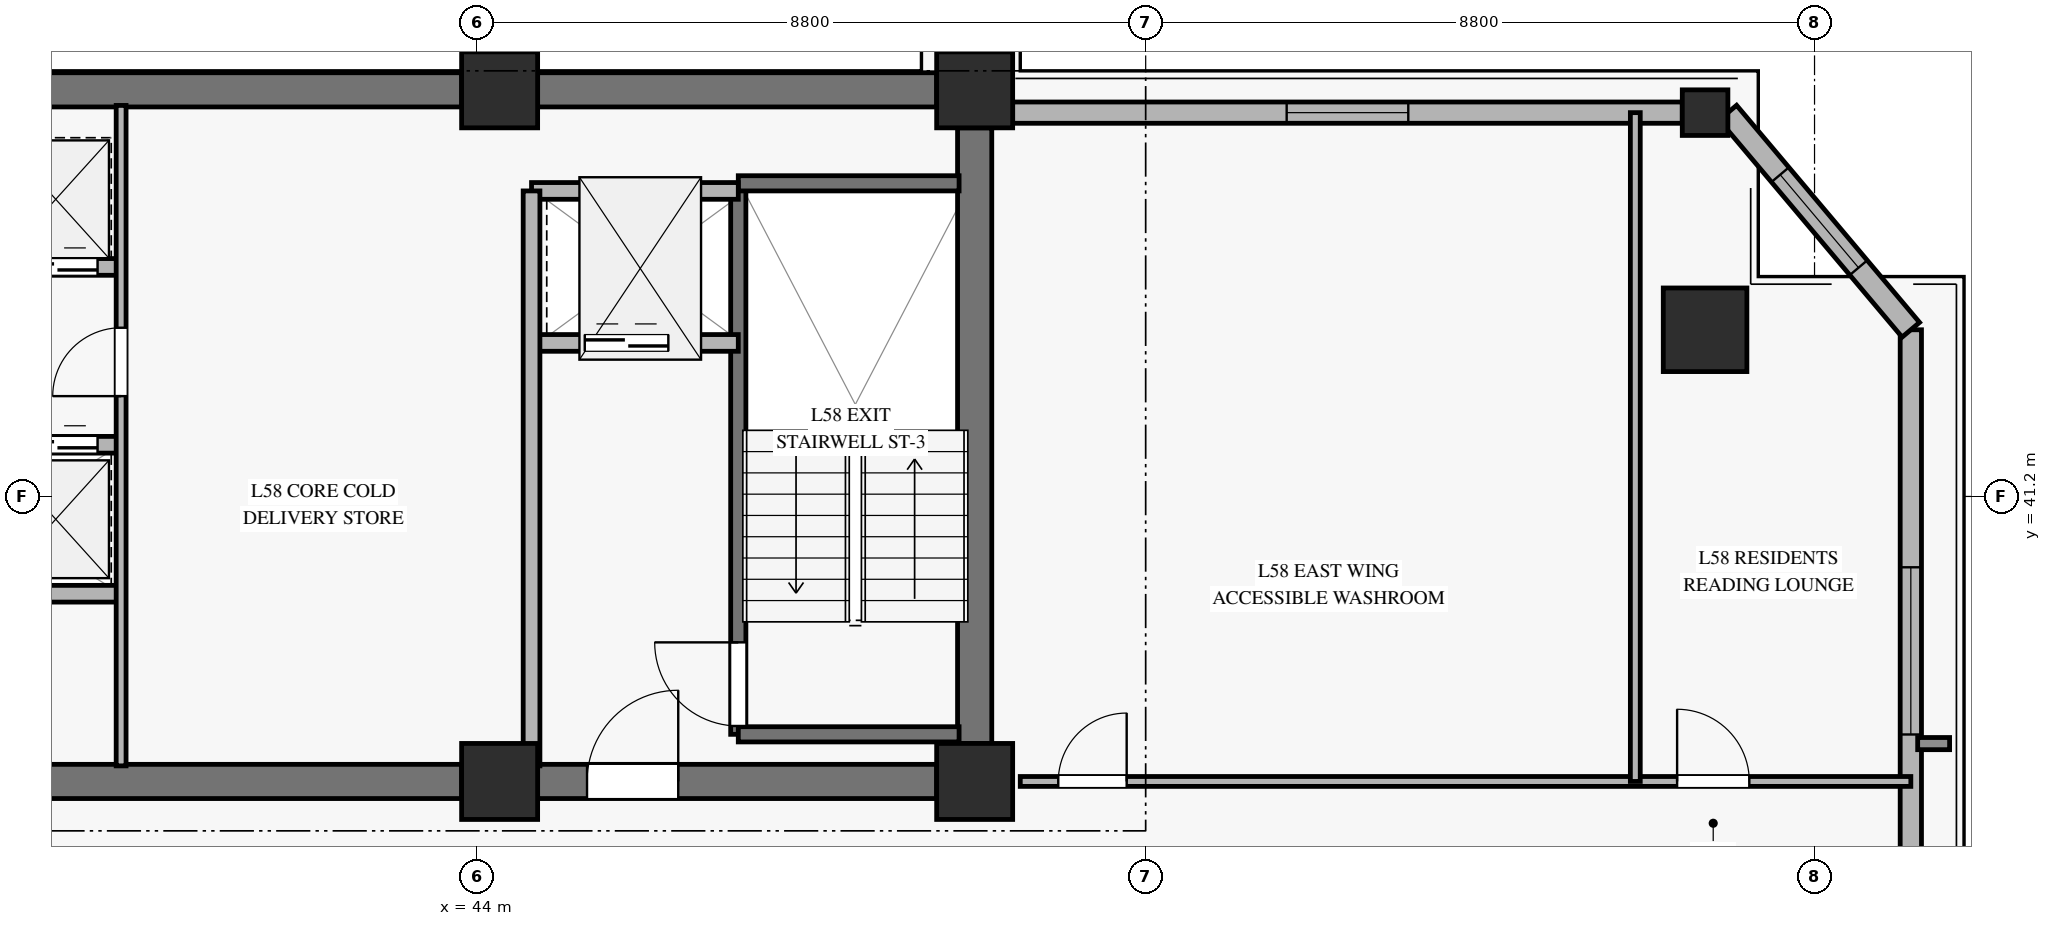
"""IFC4 building model, lengths in metres.
Left out: names, types, materials, properties, quantities, classifications, styles, units other than length and angle.
Written with IfcOpenShell. Run it as: python <this file> out.ifc"""

import sys

from ifc_helpers import new_model, si_unit, direction, frame, frame_2d, origin, origin_2d, place, context, subcontext, project, spatial, rectangle, hollow_rectangle, extrude, source, transform, mapped, element, fill, save


model = new_model("IFC4")
c1 = context("Model", 3, precision=1e-05, world=origin(), true_north=direction((0.0, 1.0)))
c2 = subcontext(c1, "Body", "Model", "MODEL_VIEW")
j1 = project(units=[si_unit("LENGTHUNIT", "METRE"), si_unit("PLANEANGLEUNIT", "RADIAN")], contexts=[c1])
p1 = place(None, origin())
s1 = spatial("IfcSite", under=j1, at=p1, CompositionType="ELEMENT")
p2 = place(p1, origin())
s2 = spatial("IfcBuilding", under=s1, at=p2, CompositionType="ELEMENT")
p3 = place(p2, frame((0.0, 0.0, 230.4)))
s3 = spatial("IfcBuildingStorey", under=s2, at=p3, CompositionType="ELEMENT", Elevation=230.4)
m1 = source(origin(), c2, "Body", "SweptSolid", [
    extrude(rectangle(XDim=1.0, YDim=1.0, at=origin_2d()), origin(), (0.0, 0.0, 1.0), 3.185),
])
for number, where, z_axis, x_axis in (
    (1, (44.3, 37.45, 0.0), (0.0, 0.0, 1.0), (1.0, 0.0, 0.0)),
    (2, (44.3, 46.55, 0.0), (0.0, 0.0, 1.0), (1.0, 0.0, 0.0)),
    (3, (50.55, 37.45, 0.0), (0.0, 0.0, 1.0), (1.0, 0.0, 0.0)),
    (4, (50.55, 46.55, 0.0), (0.0, 0.0, 1.0), (1.0, 0.0, 0.0)),
):
    element("IfcColumn", number, at=place(p3, frame(where, z_axis=z_axis, x_axis=x_axis)), inside=s3, PredefinedType="PILASTER", context=c2, shape_type="MappedRepresentation", body=[
        mapped(m1, transform((0.0, 0.0, 0.0), x_axis=(1.0, 0.0, 0.0), y_axis=(0.0, 1.0, 0.0), z_axis=(0.0, 0.0, 1.0), scale=1.0)),
    ])
p4 = place(p3, frame((36.1, 46.55, 0.0), z_axis=(0.0, 0.0, 1.0), x_axis=(1.0, 0.0, 0.0)))
e5 = element("IfcWall", 5, at=p4, inside=s3, PredefinedType="SHEAR", context=c2, shape_type="SweptSolid", body=[
    extrude(rectangle(XDim=7.7, YDim=0.45, at=frame_2d((3.85, 0.0))), origin(), (0.0, 0.0, 1.0), 3.185),
])
p5 = place(p3, frame((44.8, 46.55, 0.0), z_axis=(0.0, 0.0, 1.0), x_axis=(1.0, 0.0, 0.0)))
e6 = element("IfcWall", 6, at=p5, inside=s3, PredefinedType="SHEAR", context=c2, shape_type="SweptSolid", body=[
    extrude(rectangle(XDim=5.25, YDim=0.45, at=frame_2d((2.625, 0.0))), origin(), (0.0, 0.0, 1.0), 3.185),
])
p6 = place(p3, frame((36.1, 37.45, 0.0), z_axis=(0.0, 0.0, 1.0), x_axis=(1.0, 0.0, 0.0)))
e7 = element("IfcWall", 7, at=p6, inside=s3, PredefinedType="SHEAR", context=c2, shape_type="SweptSolid", body=[
    extrude(rectangle(XDim=7.7, YDim=0.45, at=frame_2d((3.85, 0.0))), origin(), (0.0, 0.0, 1.0), 3.185),
])
p7 = place(p3, frame((44.8, 37.45, 0.0), z_axis=(0.0, 0.0, 1.0), x_axis=(1.0, 0.0, 0.0)))
e8 = element("IfcWall", 8, at=p7, inside=s3, PredefinedType="SHEAR", context=c2, shape_type="SweptSolid", body=[
    extrude(rectangle(XDim=5.25, YDim=0.45, at=frame_2d((2.625, 0.0))), origin(), (0.0, 0.0, 1.0), 3.185),
])
p8 = place(p7, frame((0.65, 0.0, 0.0)))
e9 = element("IfcOpeningElement", 9, at=p8, cuts=e8, PredefinedType="OPENING", context=c2, shape_type="SweptSolid", body=[
    extrude(rectangle(XDim=1.2, YDim=2.15, at=frame_2d((0.6, 1.075))), frame((0.0, 0.235, 0.0), z_axis=(0.0, -1.0, 0.0), x_axis=(1.0, 0.0, 0.0)), (0.0, 0.0, 1.0), 0.47),
])
p9 = place(p3, frame((50.55, 37.95, 0.0), z_axis=(0.0, 0.0, 1.0), x_axis=(0.0, 1.0, 0.0)))
e10 = element("IfcWall", 10, at=p9, inside=s3, PredefinedType="SHEAR", context=c2, shape_type="SweptSolid", body=[
    extrude(rectangle(XDim=8.1, YDim=0.45, at=frame_2d((4.05, 0.0))), origin(), (0.0, 0.0, 1.0), 3.185),
])
m2 = source(origin(), c2, "Body", "SweptSolid", [
    extrude(hollow_rectangle(XDim=1.1, YDim=1.1, WallThickness=0.05, at=origin_2d()), origin(), (0.0, 0.0, 1.0), 3.185),
])
p10 = place(p3, frame((60.16, 43.393, 0.0), z_axis=(0.0, 0.0, 1.0), x_axis=(1.0, 0.0, 0.0)))
e11 = element("IfcColumn", 11, at=p10, inside=s3, PredefinedType="COLUMN", context=c2, shape_type="MappedRepresentation", body=[
    mapped(m2, transform((0.0, 0.0, 0.0), x_axis=(1.0, 0.0, 0.0), y_axis=(0.0, 1.0, 0.0), z_axis=(0.0, 0.0, 1.0), scale=1.0)),
])
m3 = source(origin(), c2, "Body", "SweptSolid", [
    extrude(hollow_rectangle(XDim=0.6, YDim=0.6, WallThickness=0.028, at=origin_2d()), origin(), (0.0, 0.0, 1.0), 3.185),
])
p11 = place(p3, frame((60.16, 46.25, 0.0), z_axis=(0.0, 0.0, 1.0), x_axis=(1.0, 0.0, 0.0)))
e12 = element("IfcColumn", 12, at=p11, inside=s3, PredefinedType="COLUMN", context=c2, shape_type="MappedRepresentation", body=[
    mapped(m3, transform((0.0, 0.0, 0.0), x_axis=(1.0, 0.0, 0.0), y_axis=(0.0, 1.0, 0.0), z_axis=(0.0, 0.0, 1.0), scale=1.0)),
])
p12 = place(p3, frame((62.867, 29.975, 0.0), z_axis=(0.0, 0.0, 1.0), x_axis=(0.0, 1.0, 0.0)))
e13 = element("IfcWall", 13, at=p12, inside=s3, PredefinedType="SOLIDWALL", context=c2, shape_type="SweptSolid", body=[
    extrude(rectangle(XDim=13.418, YDim=0.28, at=frame_2d((6.709, 0.0))), origin(), (0.0, 0.0, 1.0), 2.815),
])
p13 = place(p12, frame((8.093, 0.0, 0.45)))
e14 = element("IfcOpeningElement", 14, at=p13, cuts=e13, PredefinedType="OPENING", context=c2, shape_type="SweptSolid", body=[
    extrude(rectangle(XDim=2.2, YDim=2.1, at=frame_2d((1.1, 1.05))), frame((0.0, 0.15, 0.0), z_axis=(0.0, -1.0, 0.0), x_axis=(1.0, 0.0, 0.0)), (0.0, 0.0, 1.0), 0.3),
])
p14 = place(p3, frame((51.05, 46.25, 0.0), z_axis=(0.0, 0.0, 1.0), x_axis=(1.0, 0.0, 0.0)))
e15 = element("IfcWall", 15, at=p14, inside=s3, PredefinedType="SOLIDWALL", context=c2, shape_type="SweptSolid", body=[
    extrude(rectangle(XDim=8.81, YDim=0.28, at=frame_2d((4.405, 0.0))), origin(), (0.0, 0.0, 1.0), 2.815),
])
p15 = place(p14, frame((3.605, 0.0, 0.45)))
e16 = element("IfcOpeningElement", 16, at=p15, cuts=e15, PredefinedType="OPENING", context=c2, shape_type="SweptSolid", body=[
    extrude(rectangle(XDim=1.6, YDim=2.0, at=frame_2d((0.8, 1.0))), frame((0.0, 0.15, 0.0), z_axis=(0.0, -1.0, 0.0), x_axis=(1.0, 0.0, 0.0)), (0.0, 0.0, 1.0), 0.3),
])
p16 = place(p3, frame((62.867, 43.393, 0.0), z_axis=(0.0, 0.0, 1.0), x_axis=(-0.644314839722, 0.764760346326, 0.0)))
e17 = element("IfcWall", 17, at=p16, inside=s3, PredefinedType="SOLIDWALL", context=c2, shape_type="SweptSolid", body=[
    extrude(rectangle(XDim=3.736, YDim=0.3, at=frame_2d((1.868, 0.0))), origin(), (0.0, 0.0, 1.0), 2.815),
])
p17 = place(p16, frame((1.068, 0.0, 0.45)))
e18 = element("IfcOpeningElement", 18, at=p17, cuts=e17, PredefinedType="OPENING", context=c2, shape_type="SweptSolid", body=[
    extrude(rectangle(XDim=1.6, YDim=2.0, at=frame_2d((0.8, 1.0))), frame((0.0, 0.16, 0.0), z_axis=(0.0, -1.0, 0.0), x_axis=(1.0, 0.0, 0.0)), (0.0, 0.0, 1.0), 0.32),
])
p18 = place(p3, frame((47.44, 38.07, 0.0), z_axis=(0.0, 0.0, 1.0), x_axis=(0.0, 1.0, 0.0)))
e19 = element("IfcWall", 19, at=p18, inside=s3, PredefinedType="SOLIDWALL", context=c2, shape_type="SweptSolid", body=[
    extrude(rectangle(XDim=7.25, YDim=0.2, at=frame_2d((3.625, 0.0))), origin(), (0.0, 0.0, 1.0), 3.4),
])
p19 = place(p18, frame((0.11, 0.0, 0.0)))
e20 = element("IfcOpeningElement", 20, at=p19, cuts=e19, PredefinedType="OPENING", context=c2, shape_type="SweptSolid", body=[
    extrude(rectangle(XDim=1.1, YDim=2.15, at=frame_2d((0.55, 1.075))), frame((0.0, 0.11, 0.0), z_axis=(0.0, -1.0, 0.0), x_axis=(1.0, 0.0, 0.0)), (0.0, 0.0, 1.0), 0.22),
])
for number, where, z_axis, x_axis in (
    (21, (47.44, 45.32, 0.0), (0.0, 0.0, 1.0), (1.0, 0.0, 0.0)),
    (22, (47.44, 38.07, 0.0), (0.0, 0.0, 1.0), (1.0, 0.0, 0.0)),
):
    element("IfcWall", number, at=place(p3, frame(where, z_axis=z_axis, x_axis=x_axis)), inside=s3, PredefinedType="SOLIDWALL", context=c2, shape_type="SweptSolid", body=[
        extrude(rectangle(XDim=2.905, YDim=0.2, at=frame_2d((1.453, 0.0))), origin(), (0.0, 0.0, 1.0), 3.4),
    ])
p20 = place(p3, frame((44.72, 43.22, 0.0), z_axis=(0.0, 0.0, 1.0), x_axis=(1.0, 0.0, 0.0)))
e23 = element("IfcWall", 23, at=p20, inside=s3, PredefinedType="SOLIDWALL", context=c2, shape_type="SweptSolid", body=[
    extrude(rectangle(XDim=2.72, YDim=0.22, at=frame_2d((1.36, 0.0))), origin(), (0.0, 0.0, 1.0), 3.185),
])
p21 = place(p20, frame((0.7, 0.0, 0.0)))
e24 = element("IfcOpeningElement", 24, at=p21, cuts=e23, PredefinedType="OPENING", context=c2, shape_type="SweptSolid", body=[
    extrude(rectangle(XDim=1.1, YDim=2.2, at=frame_2d((0.55, 1.1))), frame((0.0, 0.12, 0.0), z_axis=(0.0, -1.0, 0.0), x_axis=(1.0, 0.0, 0.0)), (0.0, 0.0, 1.0), 0.24),
])
p22 = place(p3, frame((44.72, 45.22, 0.0), z_axis=(0.0, 0.0, 1.0), x_axis=(1.0, 0.0, 0.0)))
e25 = element("IfcWall", 25, at=p22, inside=s3, PredefinedType="SOLIDWALL", context=c2, shape_type="SweptSolid", body=[
    extrude(rectangle(XDim=2.72, YDim=0.22, at=frame_2d((1.36, 0.0))), origin(), (0.0, 0.0, 1.0), 3.185),
])
p23 = place(p3, frame((44.72, 37.655, 0.0), z_axis=(0.0, 0.0, 1.0), x_axis=(0.0, 1.0, 0.0)))
e26 = element("IfcWall", 26, at=p23, inside=s3, PredefinedType="SOLIDWALL", context=c2, shape_type="SweptSolid", body=[
    extrude(rectangle(XDim=7.565, YDim=0.22, at=frame_2d((3.782, 0.0))), origin(), (0.0, 0.0, 1.0), 3.185),
])
p24 = place(p3, frame((36.12, 44.22, 0.0), z_axis=(0.0, 0.0, 1.0), x_axis=(1.0, 0.0, 0.0)))
e27 = element("IfcWall", 27, at=p24, inside=s3, PredefinedType="SOLIDWALL", context=c2, shape_type="SweptSolid", body=[
    extrude(rectangle(XDim=3.2, YDim=0.22, at=frame_2d((1.6, 0.0))), origin(), (0.0, 0.0, 1.0), 3.185),
])
p25 = place(p24, frame((0.3, 0.0, 0.0)))
e28 = element("IfcOpeningElement", 28, at=p25, cuts=e27, PredefinedType="OPENING", context=c2, shape_type="SweptSolid", body=[
    extrude(rectangle(XDim=1.1, YDim=2.2, at=frame_2d((0.55, 1.1))), frame((0.0, 0.12, 0.0), z_axis=(0.0, -1.0, 0.0), x_axis=(1.0, 0.0, 0.0)), (0.0, 0.0, 1.0), 0.24),
])
p26 = place(p24, frame((1.79, 0.0, 0.0)))
e29 = element("IfcOpeningElement", 29, at=p26, cuts=e27, PredefinedType="OPENING", context=c2, shape_type="SweptSolid", body=[
    extrude(rectangle(XDim=1.1, YDim=2.2, at=frame_2d((0.55, 1.1))), frame((0.0, 0.12, 0.0), z_axis=(0.0, -1.0, 0.0), x_axis=(1.0, 0.0, 0.0)), (0.0, 0.0, 1.0), 0.24),
])
p27 = place(p3, frame((36.12, 41.88, 0.0), z_axis=(0.0, 0.0, 1.0), x_axis=(1.0, 0.0, 0.0)))
e30 = element("IfcWall", 30, at=p27, inside=s3, PredefinedType="SOLIDWALL", context=c2, shape_type="SweptSolid", body=[
    extrude(rectangle(XDim=3.2, YDim=0.22, at=frame_2d((1.6, 0.0))), origin(), (0.0, 0.0, 1.0), 3.185),
])
p28 = place(p27, frame((0.3, 0.0, 0.0)))
e31 = element("IfcOpeningElement", 31, at=p28, cuts=e30, PredefinedType="OPENING", context=c2, shape_type="SweptSolid", body=[
    extrude(rectangle(XDim=1.1, YDim=2.2, at=frame_2d((0.55, 1.1))), frame((0.0, 0.12, 0.0), z_axis=(0.0, -1.0, 0.0), x_axis=(1.0, 0.0, 0.0)), (0.0, 0.0, 1.0), 0.24),
])
p29 = place(p27, frame((1.79, 0.0, 0.0)))
e32 = element("IfcOpeningElement", 32, at=p29, cuts=e30, PredefinedType="OPENING", context=c2, shape_type="SweptSolid", body=[
    extrude(rectangle(XDim=1.1, YDim=2.2, at=frame_2d((0.55, 1.1))), frame((0.0, 0.12, 0.0), z_axis=(0.0, -1.0, 0.0), x_axis=(1.0, 0.0, 0.0)), (0.0, 0.0, 1.0), 0.24),
])
p30 = place(p3, frame((36.12, 39.92, 0.0), z_axis=(0.0, 0.0, 1.0), x_axis=(1.0, 0.0, 0.0)))
e33 = element("IfcWall", 33, at=p30, inside=s3, PredefinedType="SOLIDWALL", context=c2, shape_type="SweptSolid", body=[
    extrude(rectangle(XDim=3.2, YDim=0.22, at=frame_2d((1.6, 0.0))), origin(), (0.0, 0.0, 1.0), 3.185),
])
p31 = place(p3, frame((39.32, 37.655, 0.0), z_axis=(0.0, 0.0, 1.0), x_axis=(0.0, 1.0, 0.0)))
e34 = element("IfcWall", 34, at=p31, inside=s3, PredefinedType="PARTITIONING", context=c2, shape_type="SweptSolid", body=[
    extrude(rectangle(XDim=8.69, YDim=0.13, at=frame_2d((4.345, 0.0))), origin(), (0.0, 0.0, 1.0), 3.185),
])
p32 = place(p31, frame((4.865, 0.0, 0.0)))
e35 = element("IfcOpeningElement", 35, at=p32, cuts=e34, PredefinedType="OPENING", context=c2, shape_type="SweptSolid", body=[
    extrude(rectangle(XDim=0.9, YDim=2.1, at=frame_2d((0.45, 1.05))), frame((0.0, 0.075, 0.0), z_axis=(0.0, -1.0, 0.0), x_axis=(1.0, 0.0, 0.0)), (0.0, 0.0, 1.0), 0.15),
])
p33 = place(p3, frame((51.15, 37.45, 0.0), z_axis=(0.0, 0.0, 1.0), x_axis=(1.0, 0.0, 0.0)))
e36 = element("IfcWall", 36, at=p33, inside=s3, PredefinedType="PARTITIONING", context=c2, shape_type="SweptSolid", body=[
    extrude(rectangle(XDim=11.717, YDim=0.13, at=frame_2d((5.858, 0.0))), origin(), (0.0, 0.0, 1.0), 2.82),
])
p34 = place(p33, frame((0.5, 0.0, 0.0)))
e37 = element("IfcOpeningElement", 37, at=p34, cuts=e36, PredefinedType="OPENING", context=c2, shape_type="SweptSolid", body=[
    extrude(rectangle(XDim=0.9, YDim=2.1, at=frame_2d((0.45, 1.05))), frame((0.0, 0.075, 0.0), z_axis=(0.0, -1.0, 0.0), x_axis=(1.0, 0.0, 0.0)), (0.0, 0.0, 1.0), 0.15),
])
p35 = place(p33, frame((8.642, 0.0, 0.0)))
e38 = element("IfcOpeningElement", 38, at=p35, cuts=e36, PredefinedType="OPENING", context=c2, shape_type="SweptSolid", body=[
    extrude(rectangle(XDim=0.95, YDim=2.1, at=frame_2d((0.475, 1.05))), frame((0.0, 0.075, 0.0), z_axis=(0.0, -1.0, 0.0), x_axis=(1.0, 0.0, 0.0)), (0.0, 0.0, 1.0), 0.15),
])
p36 = place(p3, frame((59.242, 37.45, 0.0), z_axis=(0.0, 0.0, 1.0), x_axis=(0.0, 1.0, 0.0)))
e39 = element("IfcWall", 39, at=p36, inside=s3, PredefinedType="PARTITIONING", context=c2, shape_type="SweptSolid", body=[
    extrude(rectangle(XDim=8.8, YDim=0.13, at=frame_2d((4.4, 0.0))), origin(), (0.0, 0.0, 1.0), 3.185),
])
m4 = source(origin(), c2, "Body", "SweptSolid", [
    extrude(rectangle(XDim=2.2, YDim=2.1, at=frame_2d((1.1, 1.05))), frame((0.0, 0.03, 0.0), z_axis=(0.0, -1.0, 0.0), x_axis=(1.0, 0.0, 0.0)), (0.0, 0.0, 1.0), 0.06),
])
p37 = place(p13, origin())
e40 = element("IfcWindow", 40, at=p37, inside=s3, PartitioningType="SINGLE_PANEL", PredefinedType="WINDOW", context=c2, shape_type="MappedRepresentation", body=[
    mapped(m4, transform((0.0, 0.0, 0.0), x_axis=(1.0, 0.0, 0.0), y_axis=(0.0, 1.0, 0.0), z_axis=(0.0, 0.0, 1.0), scale=1.0)),
])
fill(e14, e40)
m5 = source(origin(), c2, "Body", "SweptSolid", [
    extrude(rectangle(XDim=1.6, YDim=2.0, at=frame_2d((0.8, 1.0))), frame((0.0, 0.03, 0.0), z_axis=(0.0, -1.0, 0.0), x_axis=(1.0, 0.0, 0.0)), (0.0, 0.0, 1.0), 0.06),
])
p38 = place(p15, origin())
e41 = element("IfcWindow", 41, at=p38, inside=s3, PartitioningType="SINGLE_PANEL", PredefinedType="WINDOW", context=c2, shape_type="MappedRepresentation", body=[
    mapped(m5, transform((0.0, 0.0, 0.0), x_axis=(1.0, 0.0, 0.0), y_axis=(0.0, 1.0, 0.0), z_axis=(0.0, 0.0, 1.0), scale=1.0)),
])
fill(e16, e41)
p39 = place(p17, origin())
e42 = element("IfcWindow", 42, at=p39, inside=s3, PartitioningType="SINGLE_PANEL", PredefinedType="WINDOW", context=c2, shape_type="MappedRepresentation", body=[
    mapped(m5, transform((0.0, 0.0, 0.0), x_axis=(1.0, 0.0, 0.0), y_axis=(0.0, 1.0, 0.0), z_axis=(0.0, 0.0, 1.0), scale=1.0)),
])
fill(e18, e42)
m6 = source(origin(), c2, "Body", "SweptSolid", [
    extrude(rectangle(XDim=1.1, YDim=2.15, at=frame_2d((0.55, 1.075))), frame((0.0, 0.025, 0.0), z_axis=(0.0, -1.0, 0.0), x_axis=(1.0, 0.0, 0.0)), (0.0, 0.0, 1.0), 0.05),
])
p40 = place(p19, origin())
e43 = element("IfcDoor", 43, at=p40, inside=s3, OperationType="SINGLE_SWING_RIGHT", PredefinedType="DOOR", context=c2, shape_type="MappedRepresentation", body=[
    mapped(m6, transform((0.0, 0.0, 0.0), x_axis=(1.0, 0.0, 0.0), y_axis=(0.0, 1.0, 0.0), z_axis=(0.0, 0.0, 1.0), scale=1.0)),
])
fill(e20, e43)
m7 = source(origin(), c2, "Body", "SweptSolid", [
    extrude(rectangle(XDim=1.1, YDim=2.2, at=frame_2d((0.55, 1.1))), frame((0.0, 0.025, 0.0), z_axis=(0.0, -1.0, 0.0), x_axis=(1.0, 0.0, 0.0)), (0.0, 0.0, 1.0), 0.05),
])
p41 = place(p21, origin())
e44 = element("IfcDoor", 44, at=p41, inside=s3, OperationType="SLIDING_TO_LEFT", PredefinedType="DOOR", context=c2, shape_type="MappedRepresentation", body=[
    mapped(m7, transform((0.0, 0.0, 0.0), x_axis=(1.0, 0.0, 0.0), y_axis=(0.0, 1.0, 0.0), z_axis=(0.0, 0.0, 1.0), scale=1.0)),
])
fill(e24, e44)
m8 = source(origin(), c2, "Body", "SweptSolid", [
    extrude(rectangle(XDim=1.2, YDim=2.15, at=frame_2d((0.6, 1.075))), frame((0.0, 0.025, 0.0), z_axis=(0.0, -1.0, 0.0), x_axis=(1.0, 0.0, 0.0)), (0.0, 0.0, 1.0), 0.05),
])
p42 = place(p8, origin())
e45 = element("IfcDoor", 45, at=p42, inside=s3, OperationType="SINGLE_SWING_RIGHT", PredefinedType="DOOR", context=c2, shape_type="MappedRepresentation", body=[
    mapped(m8, transform((0.0, 0.0, 0.0), x_axis=(1.0, 0.0, 0.0), y_axis=(0.0, 1.0, 0.0), z_axis=(0.0, 0.0, 1.0), scale=1.0)),
])
fill(e9, e45)
p43 = place(p26, origin())
e46 = element("IfcDoor", 46, at=p43, inside=s3, OperationType="SLIDING_TO_LEFT", PredefinedType="DOOR", context=c2, shape_type="MappedRepresentation", body=[
    mapped(m7, transform((0.0, 0.0, 0.0), x_axis=(1.0, 0.0, 0.0), y_axis=(0.0, 1.0, 0.0), z_axis=(0.0, 0.0, 1.0), scale=1.0)),
])
fill(e29, e46)
p44 = place(p29, origin())
e47 = element("IfcDoor", 47, at=p44, inside=s3, OperationType="SLIDING_TO_LEFT", PredefinedType="DOOR", context=c2, shape_type="MappedRepresentation", body=[
    mapped(m7, transform((0.0, 0.0, 0.0), x_axis=(1.0, 0.0, 0.0), y_axis=(0.0, 1.0, 0.0), z_axis=(0.0, 0.0, 1.0), scale=1.0)),
])
fill(e32, e47)
m9 = source(origin(), c2, "Body", "SweptSolid", [
    extrude(rectangle(XDim=0.9, YDim=2.1, at=frame_2d((0.45, 1.05))), frame((0.0, 0.025, 0.0), z_axis=(0.0, -1.0, 0.0), x_axis=(1.0, 0.0, 0.0)), (0.0, 0.0, 1.0), 0.05),
])
p45 = place(p32, origin())
e48 = element("IfcDoor", 48, at=p45, inside=s3, OperationType="SINGLE_SWING_LEFT", PredefinedType="DOOR", context=c2, shape_type="MappedRepresentation", body=[
    mapped(m9, transform((0.0, 0.0, 0.0), x_axis=(1.0, 0.0, 0.0), y_axis=(0.0, 1.0, 0.0), z_axis=(0.0, 0.0, 1.0), scale=1.0)),
])
fill(e35, e48)
p46 = place(p34, origin())
e49 = element("IfcDoor", 49, at=p46, inside=s3, OperationType="SINGLE_SWING_RIGHT", PredefinedType="DOOR", context=c2, shape_type="MappedRepresentation", body=[
    mapped(m9, transform((0.0, 0.0, 0.0), x_axis=(1.0, 0.0, 0.0), y_axis=(0.0, 1.0, 0.0), z_axis=(0.0, 0.0, 1.0), scale=1.0)),
])
fill(e37, e49)
m10 = source(origin(), c2, "Body", "SweptSolid", [
    extrude(rectangle(XDim=0.95, YDim=2.1, at=frame_2d((0.475, 1.05))), frame((0.0, 0.025, 0.0), z_axis=(0.0, -1.0, 0.0), x_axis=(1.0, 0.0, 0.0)), (0.0, 0.0, 1.0), 0.05),
])
p47 = place(p35, origin())
e50 = element("IfcDoor", 50, at=p47, inside=s3, OperationType="SINGLE_SWING_LEFT", PredefinedType="DOOR", context=c2, shape_type="MappedRepresentation", body=[
    mapped(m10, transform((0.0, 0.0, 0.0), x_axis=(1.0, 0.0, 0.0), y_axis=(0.0, 1.0, 0.0), z_axis=(0.0, 0.0, 1.0), scale=1.0)),
])
fill(e38, e50)
save(model, sys.argv[1])
